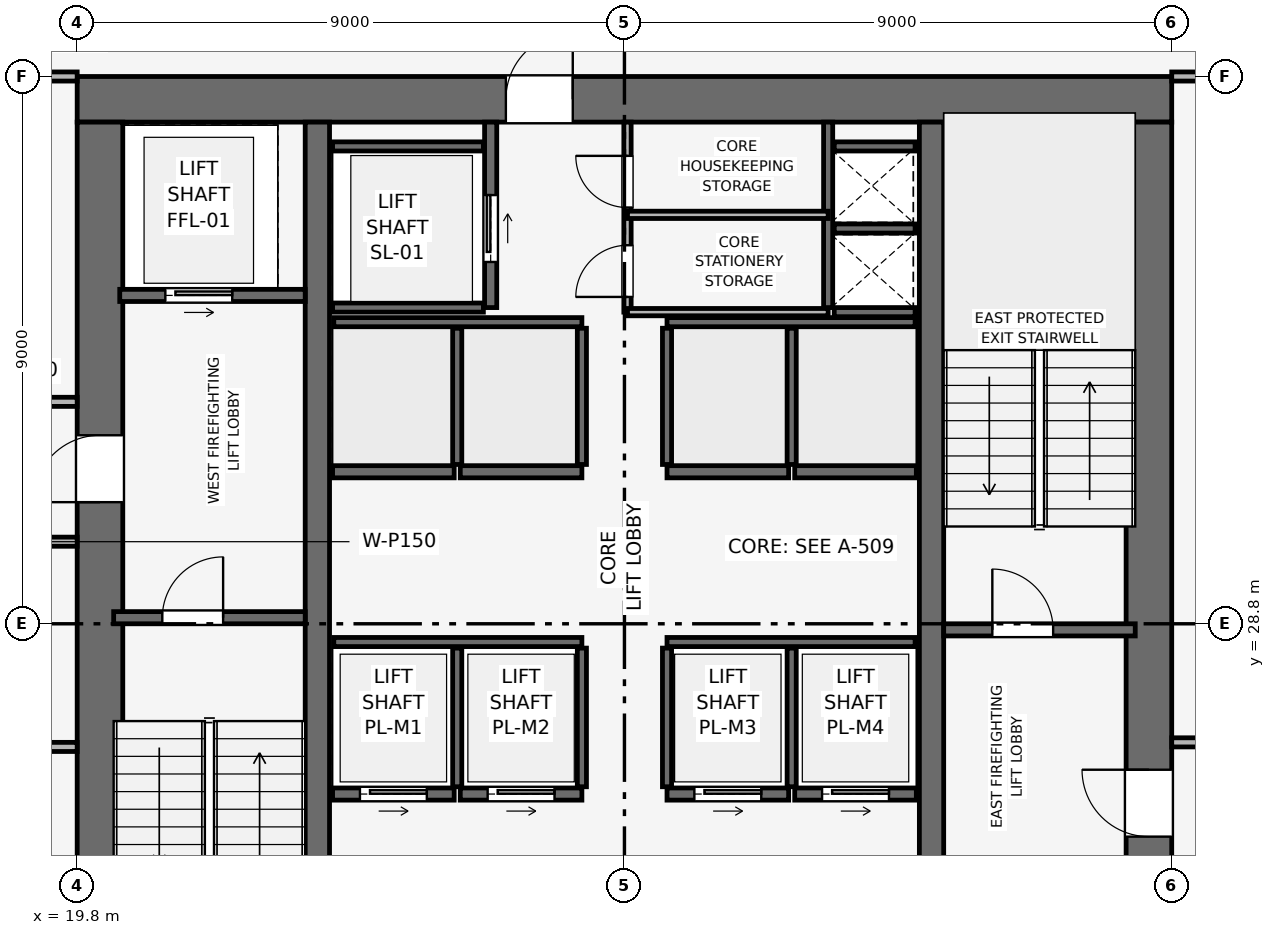
"""IFC4 building model, lengths in metres.
Left out: names, types, materials, properties, quantities, classifications, styles, units other than length and angle.
Written with IfcOpenShell. Run it as: python <this file> out.ifc"""

import sys

from ifc_helpers import new_model, si_unit, direction, frame, frame_2d, origin, place, context, subcontext, project, spatial, rectangle, extrude, element, fill, save


model = new_model("IFC4")
c1 = context("Model", 3, precision=1e-05, world=origin(), true_north=direction((0.0, 1.0)))
c2 = subcontext(c1, "Body", "Model", "MODEL_VIEW")
j1 = project(units=[si_unit("LENGTHUNIT", "METRE"), si_unit("PLANEANGLEUNIT", "RADIAN")], contexts=[c1])
p1 = place(None, origin())
s1 = spatial("IfcSite", under=j1, at=p1, CompositionType="ELEMENT")
p2 = place(p1, origin())
s2 = spatial("IfcBuilding", under=s1, at=p2, CompositionType="ELEMENT")
p3 = place(p2, frame((0.0, 0.0, 199.95)))
s3 = spatial("IfcBuildingStorey", under=s2, at=p3, CompositionType="ELEMENT", Elevation=199.95)
p4 = place(p3, frame((19.8, 37.425, 0.0), z_axis=(0.0, 0.0, 1.0), x_axis=(1.0, 0.0, 0.0)))
e1 = element("IfcWall", 1, at=p4, inside=s3, PredefinedType="SHEAR", context=c2, shape_type="SweptSolid", body=[
    extrude(rectangle(XDim=18.0, YDim=0.75, at=frame_2d((9.0, 0.0))), origin(), (0.0, 0.0, 1.0), 3.75),
])
p5 = place(p4, frame((7.05, 0.0, 0.0)))
e2 = element("IfcOpeningElement", 2, at=p5, cuts=e1, PredefinedType="OPENING", context=c2, shape_type="SweptSolid", body=[
    extrude(rectangle(XDim=1.1, YDim=2.15, at=frame_2d((0.55, 1.075))), frame((0.0, 0.385, 0.0), z_axis=(0.0, -1.0, 0.0), x_axis=(1.0, 0.0, 0.0)), (0.0, 0.0, 1.0), 0.77),
])
p6 = place(p3, frame((20.175, 20.55, 0.0), z_axis=(0.0, 0.0, 1.0), x_axis=(0.0, 1.0, 0.0)))
e3 = element("IfcWall", 3, at=p6, inside=s3, PredefinedType="SHEAR", context=c2, shape_type="SweptSolid", body=[
    extrude(rectangle(XDim=16.5, YDim=0.75, at=frame_2d((8.25, 0.0))), origin(), (0.0, 0.0, 1.0), 3.75),
])
p7 = place(p6, frame((10.25, 0.0, 0.0)))
e4 = element("IfcOpeningElement", 4, at=p7, cuts=e3, PredefinedType="OPENING", context=c2, shape_type="SweptSolid", body=[
    extrude(rectangle(XDim=1.1, YDim=2.15, at=frame_2d((0.55, 1.075))), frame((0.0, 0.385, 0.0), z_axis=(0.0, -1.0, 0.0), x_axis=(1.0, 0.0, 0.0)), (0.0, 0.0, 1.0), 0.77),
])
p8 = place(p3, frame((37.425, 20.55, 0.0), z_axis=(0.0, 0.0, 1.0), x_axis=(0.0, 1.0, 0.0)))
e5 = element("IfcWall", 5, at=p8, inside=s3, PredefinedType="SHEAR", context=c2, shape_type="SweptSolid", body=[
    extrude(rectangle(XDim=16.5, YDim=0.75, at=frame_2d((8.25, 0.0))), origin(), (0.0, 0.0, 1.0), 3.75),
])
p9 = place(p8, frame((4.75, 0.0, 0.0)))
e6 = element("IfcOpeningElement", 6, at=p9, cuts=e5, PredefinedType="OPENING", context=c2, shape_type="SweptSolid", body=[
    extrude(rectangle(XDim=1.1, YDim=2.15, at=frame_2d((0.55, 1.075))), frame((0.0, 0.385, 0.0), z_axis=(0.0, -1.0, 0.0), x_axis=(1.0, 0.0, 0.0)), (0.0, 0.0, 1.0), 0.77),
])
for number, where, z_axis, x_axis in (
    (7, (23.75, 20.55, 0.0), (0.0, 0.0, 1.0), (0.0, 1.0, 0.0)),
    (8, (33.85, 20.55, 0.0), (0.0, 0.0, 1.0), (0.0, 1.0, 0.0)),
):
    element("IfcWall", number, at=place(p3, frame(where, z_axis=z_axis, x_axis=x_axis)), inside=s3, PredefinedType="SHEAR", context=c2, shape_type="SweptSolid", body=[
        extrude(rectangle(XDim=16.5, YDim=0.4, at=frame_2d((8.25, 0.0))), origin(), (0.0, 0.0, 1.0), 3.75),
    ])
p10 = place(p3, frame((20.4, 28.9, 0.0), z_axis=(0.0, 0.0, 1.0), x_axis=(1.0, 0.0, 0.0)))
e9 = element("IfcWall", 9, at=p10, inside=s3, PredefinedType="SHEAR", context=c2, shape_type="SweptSolid", body=[
    extrude(rectangle(XDim=3.15, YDim=0.2, at=frame_2d((1.575, 0.0))), origin(), (0.0, 0.0, 1.0), 3.5),
])
p11 = place(p10, frame((0.8, 0.0, 0.0)))
e10 = element("IfcOpeningElement", 10, at=p11, cuts=e9, PredefinedType="OPENING", context=c2, shape_type="SweptSolid", body=[
    extrude(rectangle(XDim=1.0, YDim=2.1, at=frame_2d((0.5, 1.05))), frame((0.0, 0.11, 0.0), z_axis=(0.0, -1.0, 0.0), x_axis=(1.0, 0.0, 0.0)), (0.0, 0.0, 1.0), 0.22),
])
p12 = place(p3, frame((34.05, 28.7, 0.0), z_axis=(0.0, 0.0, 1.0), x_axis=(1.0, 0.0, 0.0)))
e11 = element("IfcWall", 11, at=p12, inside=s3, PredefinedType="SHEAR", context=c2, shape_type="SweptSolid", body=[
    extrude(rectangle(XDim=3.15, YDim=0.2, at=frame_2d((1.575, 0.0))), origin(), (0.0, 0.0, 1.0), 3.5),
])
p13 = place(p12, frame((0.8, 0.0, 0.0)))
e12 = element("IfcOpeningElement", 12, at=p13, cuts=e11, PredefinedType="OPENING", context=c2, shape_type="SweptSolid", body=[
    extrude(rectangle(XDim=1.0, YDim=2.1, at=frame_2d((0.5, 1.05))), frame((0.0, 0.11, 0.0), z_axis=(0.0, -1.0, 0.0), x_axis=(1.0, 0.0, 0.0)), (0.0, 0.0, 1.0), 0.22),
])
p14 = place(p3, frame((32.15, 34.0, 0.0), z_axis=(0.0, 0.0, 1.0), x_axis=(0.0, 1.0, 0.0)))
e13 = element("IfcWall", 13, at=p14, inside=s3, PredefinedType="SHEAR", context=c2, shape_type="SweptSolid", body=[
    extrude(rectangle(XDim=3.05, YDim=0.15, at=frame_2d((1.525, 0.0))), origin(), (0.0, 0.0, 1.0), 3.5),
])
for number, where, z_axis, x_axis in (
    (14, (32.25, 33.925, 0.0), (0.0, 0.0, 1.0), (1.0, 0.0, 0.0)),
    (15, (32.25, 35.3, 0.0), (0.0, 0.0, 1.0), (1.0, 0.0, 0.0)),
):
    element("IfcWall", number, at=place(p3, frame(where, z_axis=z_axis, x_axis=x_axis)), inside=s3, PredefinedType="SHEAR", context=c2, shape_type="SweptSolid", body=[
        extrude(rectangle(XDim=1.33, YDim=0.15, at=frame_2d((0.665, 0.0))), origin(), (0.0, 0.0, 1.0), 3.5),
    ])
p15 = place(p3, frame((20.5, 34.2, 0.0), z_axis=(0.0, 0.0, 1.0), x_axis=(1.0, 0.0, 0.0)))
e16 = element("IfcWall", 16, at=p15, inside=s3, PredefinedType="SHEAR", context=c2, shape_type="SweptSolid", body=[
    extrude(rectangle(XDim=3.05, YDim=0.2, at=frame_2d((1.525, 0.0))), origin(), (0.0, 0.0, 1.0), 3.5),
])
p16 = place(p15, frame((0.75, 0.0, 0.0)))
e17 = element("IfcOpeningElement", 17, at=p16, cuts=e16, PredefinedType="OPENING", context=c2, shape_type="SweptSolid", body=[
    extrude(rectangle(XDim=1.1, YDim=2.15, at=frame_2d((0.55, 1.075))), frame((0.0, 0.11, 0.0), z_axis=(0.0, -1.0, 0.0), x_axis=(1.0, 0.0, 0.0)), (0.0, 0.0, 1.0), 0.22),
])
p17 = place(p3, frame((26.6, 34.0, 0.0), z_axis=(0.0, 0.0, 1.0), x_axis=(0.0, 1.0, 0.0)))
e18 = element("IfcWall", 18, at=p17, inside=s3, PredefinedType="SHEAR", context=c2, shape_type="SweptSolid", body=[
    extrude(rectangle(XDim=3.05, YDim=0.2, at=frame_2d((1.525, 0.0))), origin(), (0.0, 0.0, 1.0), 3.5),
])
p18 = place(p17, frame((0.75, 0.0, 0.0)))
e19 = element("IfcOpeningElement", 19, at=p18, cuts=e18, PredefinedType="OPENING", context=c2, shape_type="SweptSolid", body=[
    extrude(rectangle(XDim=1.1, YDim=2.15, at=frame_2d((0.55, 1.075))), frame((0.0, 0.11, 0.0), z_axis=(0.0, -1.0, 0.0), x_axis=(1.0, 0.0, 0.0)), (0.0, 0.0, 1.0), 0.22),
])
for number, where, z_axis, x_axis in (
    (20, (24.0, 34.0, 0.0), (0.0, 0.0, 1.0), (1.0, 0.0, 0.0)),
    (21, (24.0, 36.65, 0.0), (0.0, 0.0, 1.0), (1.0, 0.0, 0.0)),
):
    element("IfcWall", number, at=place(p3, frame(where, z_axis=z_axis, x_axis=x_axis)), inside=s3, PredefinedType="SHEAR", context=c2, shape_type="SweptSolid", body=[
        extrude(rectangle(XDim=2.48, YDim=0.15, at=frame_2d((1.24, 0.0))), origin(), (0.0, 0.0, 1.0), 3.5),
    ])
p19 = place(p3, frame((24.0, 26.0, 0.0), z_axis=(0.0, 0.0, 1.0), x_axis=(1.0, 0.0, 0.0)))
e22 = element("IfcWall", 22, at=p19, inside=s3, PredefinedType="SHEAR", context=c2, shape_type="SweptSolid", body=[
    extrude(rectangle(XDim=2.0, YDim=0.2, at=frame_2d((1.0, 0.0))), origin(), (0.0, 0.0, 1.0), 3.5),
])
p20 = place(p19, frame((0.45, 0.0, 0.0)))
e23 = element("IfcOpeningElement", 23, at=p20, cuts=e22, PredefinedType="OPENING", context=c2, shape_type="SweptSolid", body=[
    extrude(rectangle(XDim=1.1, YDim=2.15, at=frame_2d((0.55, 1.075))), frame((0.0, 0.11, 0.0), z_axis=(0.0, -1.0, 0.0), x_axis=(1.0, 0.0, 0.0)), (0.0, 0.0, 1.0), 0.22),
])
p21 = place(p3, frame((26.1, 26.0, 0.0), z_axis=(0.0, 0.0, 1.0), x_axis=(1.0, 0.0, 0.0)))
e24 = element("IfcWall", 24, at=p21, inside=s3, PredefinedType="SHEAR", context=c2, shape_type="SweptSolid", body=[
    extrude(rectangle(XDim=2.0, YDim=0.2, at=frame_2d((1.0, 0.0))), origin(), (0.0, 0.0, 1.0), 3.5),
])
p22 = place(p21, frame((0.45, 0.0, 0.0)))
e25 = element("IfcOpeningElement", 25, at=p22, cuts=e24, PredefinedType="OPENING", context=c2, shape_type="SweptSolid", body=[
    extrude(rectangle(XDim=1.1, YDim=2.15, at=frame_2d((0.55, 1.075))), frame((0.0, 0.11, 0.0), z_axis=(0.0, -1.0, 0.0), x_axis=(1.0, 0.0, 0.0)), (0.0, 0.0, 1.0), 0.22),
])
p23 = place(p3, frame((29.5, 26.0, 0.0), z_axis=(0.0, 0.0, 1.0), x_axis=(1.0, 0.0, 0.0)))
e26 = element("IfcWall", 26, at=p23, inside=s3, PredefinedType="SHEAR", context=c2, shape_type="SweptSolid", body=[
    extrude(rectangle(XDim=2.0, YDim=0.2, at=frame_2d((1.0, 0.0))), origin(), (0.0, 0.0, 1.0), 3.5),
])
p24 = place(p23, frame((0.45, 0.0, 0.0)))
e27 = element("IfcOpeningElement", 27, at=p24, cuts=e26, PredefinedType="OPENING", context=c2, shape_type="SweptSolid", body=[
    extrude(rectangle(XDim=1.1, YDim=2.15, at=frame_2d((0.55, 1.075))), frame((0.0, 0.11, 0.0), z_axis=(0.0, -1.0, 0.0), x_axis=(1.0, 0.0, 0.0)), (0.0, 0.0, 1.0), 0.22),
])
p25 = place(p3, frame((31.6, 26.0, 0.0), z_axis=(0.0, 0.0, 1.0), x_axis=(1.0, 0.0, 0.0)))
e28 = element("IfcWall", 28, at=p25, inside=s3, PredefinedType="SHEAR", context=c2, shape_type="SweptSolid", body=[
    extrude(rectangle(XDim=2.0, YDim=0.2, at=frame_2d((1.0, 0.0))), origin(), (0.0, 0.0, 1.0), 3.5),
])
p26 = place(p25, frame((0.45, 0.0, 0.0)))
e29 = element("IfcOpeningElement", 29, at=p26, cuts=e28, PredefinedType="OPENING", context=c2, shape_type="SweptSolid", body=[
    extrude(rectangle(XDim=1.1, YDim=2.15, at=frame_2d((0.55, 1.075))), frame((0.0, 0.11, 0.0), z_axis=(0.0, -1.0, 0.0), x_axis=(1.0, 0.0, 0.0)), (0.0, 0.0, 1.0), 0.22),
])
for number, where, z_axis, x_axis in (
    (30, (24.0, 31.3, 0.0), (0.0, 0.0, 1.0), (1.0, 0.0, 0.0)),
    (31, (26.1, 31.3, 0.0), (0.0, 0.0, 1.0), (1.0, 0.0, 0.0)),
    (32, (29.5, 31.3, 0.0), (0.0, 0.0, 1.0), (1.0, 0.0, 0.0)),
    (33, (31.6, 31.3, 0.0), (0.0, 0.0, 1.0), (1.0, 0.0, 0.0)),
):
    element("IfcWall", number, at=place(p3, frame(where, z_axis=z_axis, x_axis=x_axis)), inside=s3, PredefinedType="SHEAR", context=c2, shape_type="SweptSolid", body=[
        extrude(rectangle(XDim=2.0, YDim=0.2, at=frame_2d((1.0, 0.0))), origin(), (0.0, 0.0, 1.0), 3.5),
    ])
p27 = place(p3, frame((32.25, 36.65, 0.0), z_axis=(0.0, 0.0, 1.0), x_axis=(1.0, 0.0, 0.0)))
e34 = element("IfcWall", 34, at=p27, inside=s3, PredefinedType="SHEAR", context=c2, shape_type="SweptSolid", body=[
    extrude(rectangle(XDim=1.33, YDim=0.15, at=frame_2d((0.665, 0.0))), origin(), (0.0, 0.0, 1.0), 3.5),
])
for number, where, z_axis, x_axis in (
    (35, (24.02, 28.5, 0.0), (0.0, 0.0, 1.0), (1.0, 0.0, 0.0)),
    (36, (29.5, 28.5, 0.0), (0.0, 0.0, 1.0), (1.0, 0.0, 0.0)),
):
    element("IfcWall", number, at=place(p3, frame(where, z_axis=z_axis, x_axis=x_axis)), inside=s3, PredefinedType="SHEAR", context=c2, shape_type="SweptSolid", body=[
        extrude(rectangle(XDim=4.08, YDim=0.15, at=frame_2d((2.04, 0.0))), origin(), (0.0, 0.0, 1.0), 3.5),
    ])
for number, where, z_axis, x_axis in (
    (37, (26.05, 26.12, 0.0), (0.0, 0.0, 1.0), (0.0, 1.0, 0.0)),
    (38, (28.1, 26.12, 0.0), (0.0, 0.0, 1.0), (0.0, 1.0, 0.0)),
    (39, (29.5, 26.12, 0.0), (0.0, 0.0, 1.0), (0.0, 1.0, 0.0)),
    (40, (31.55, 26.12, 0.0), (0.0, 0.0, 1.0), (0.0, 1.0, 0.0)),
):
    element("IfcWall", number, at=place(p3, frame(where, z_axis=z_axis, x_axis=x_axis)), inside=s3, PredefinedType="SHEAR", context=c2, shape_type="SweptSolid", body=[
        extrude(rectangle(XDim=2.28, YDim=0.15, at=frame_2d((1.14, 0.0))), origin(), (0.0, 0.0, 1.0), 3.5),
    ])
for number, where, z_axis, x_axis in (
    (41, (24.02, 33.76, 0.0), (0.0, 0.0, 1.0), (1.0, 0.0, 0.0)),
    (42, (29.5, 33.76, 0.0), (0.0, 0.0, 1.0), (1.0, 0.0, 0.0)),
):
    element("IfcWall", number, at=place(p3, frame(where, z_axis=z_axis, x_axis=x_axis)), inside=s3, PredefinedType="SHEAR", context=c2, shape_type="SweptSolid", body=[
        extrude(rectangle(XDim=4.08, YDim=0.15, at=frame_2d((2.04, 0.0))), origin(), (0.0, 0.0, 1.0), 3.5),
    ])
for number, where, z_axis, x_axis in (
    (43, (26.05, 31.42, 0.0), (0.0, 0.0, 1.0), (0.0, 1.0, 0.0)),
    (44, (28.1, 31.42, 0.0), (0.0, 0.0, 1.0), (0.0, 1.0, 0.0)),
    (45, (29.5, 31.42, 0.0), (0.0, 0.0, 1.0), (0.0, 1.0, 0.0)),
    (46, (31.55, 31.42, 0.0), (0.0, 0.0, 1.0), (0.0, 1.0, 0.0)),
):
    element("IfcWall", number, at=place(p3, frame(where, z_axis=z_axis, x_axis=x_axis)), inside=s3, PredefinedType="SHEAR", context=c2, shape_type="SweptSolid", body=[
        extrude(rectangle(XDim=2.24, YDim=0.15, at=frame_2d((1.12, 0.0))), origin(), (0.0, 0.0, 1.0), 3.5),
    ])
p28 = place(p3, frame((28.85, 33.925, 0.0), z_axis=(0.0, 0.0, 1.0), x_axis=(0.0, 1.0, 0.0)))
e47 = element("IfcWall", 47, at=p28, inside=s3, PredefinedType="PARTITIONING", context=c2, shape_type="SweptSolid", body=[
    extrude(rectangle(XDim=3.125, YDim=0.12, at=frame_2d((1.562, 0.0))), origin(), (0.0, 0.0, 1.0), 3.5),
])
p29 = place(p28, frame((0.25, 0.0, 0.0)))
e48 = element("IfcOpeningElement", 48, at=p29, cuts=e47, PredefinedType="OPENING", context=c2, shape_type="SweptSolid", body=[
    extrude(rectangle(XDim=0.85, YDim=2.1, at=frame_2d((0.425, 1.05))), frame((0.0, 0.07, 0.0), z_axis=(0.0, -1.0, 0.0), x_axis=(1.0, 0.0, 0.0)), (0.0, 0.0, 1.0), 0.14),
])
p30 = place(p28, frame((1.72, 0.0, 0.0)))
e49 = element("IfcOpeningElement", 49, at=p30, cuts=e47, PredefinedType="OPENING", context=c2, shape_type="SweptSolid", body=[
    extrude(rectangle(XDim=0.85, YDim=2.1, at=frame_2d((0.425, 1.05))), frame((0.0, 0.07, 0.0), z_axis=(0.0, -1.0, 0.0), x_axis=(1.0, 0.0, 0.0)), (0.0, 0.0, 1.0), 0.14),
])
for number, where, z_axis, x_axis in (
    (50, (28.85, 35.525, 0.0), (0.0, 0.0, 1.0), (1.0, 0.0, 0.0)),
    (51, (28.85, 33.925, 0.0), (0.0, 0.0, 1.0), (1.0, 0.0, 0.0)),
):
    element("IfcWall", number, at=place(p3, frame(where, z_axis=z_axis, x_axis=x_axis)), inside=s3, PredefinedType="PARTITIONING", context=c2, shape_type="SweptSolid", body=[
        extrude(rectangle(XDim=3.3, YDim=0.12, at=frame_2d((1.65, 0.0))), origin(), (0.0, 0.0, 1.0), 3.5),
    ])
for number, where, z_axis, x_axis in (
    (52, (15.4, 26.775, 0.0), (0.0, 0.0, 1.0), (1.0, 0.0, 0.0)),
    (53, (15.4, 30.15, 0.0), (0.0, 0.0, 1.0), (1.0, 0.0, 0.0)),
    (54, (15.4, 32.45, 0.0), (0.0, 0.0, 1.0), (1.0, 0.0, 0.0)),
):
    element("IfcWall", number, at=place(p3, frame(where, z_axis=z_axis, x_axis=x_axis)), inside=s3, PredefinedType="PARTITIONING", context=c2, shape_type="SweptSolid", body=[
        extrude(rectangle(XDim=4.4, YDim=0.15, at=frame_2d((2.2, 0.0))), origin(), (0.0, 0.0, 1.0), 3.5),
    ])
p31 = place(p3, frame((15.4, 37.8, 0.0), z_axis=(0.0, 0.0, 1.0), x_axis=(1.0, 0.0, 0.0)))
e55 = element("IfcWall", 55, at=p31, inside=s3, PredefinedType="PARTITIONING", context=c2, shape_type="SweptSolid", body=[
    extrude(rectangle(XDim=4.4, YDim=0.15, at=frame_2d((2.2, 0.0))), origin(), (0.0, 0.0, 1.0), 3.035),
])
p32 = place(p3, frame((37.8, 26.85, 0.0), z_axis=(0.0, 0.0, 1.0), x_axis=(1.0, 0.0, 0.0)))
e56 = element("IfcWall", 56, at=p32, inside=s3, PredefinedType="PARTITIONING", context=c2, shape_type="SweptSolid", body=[
    extrude(rectangle(XDim=2.25, YDim=0.15, at=frame_2d((1.125, 0.0))), origin(), (0.0, 0.0, 1.0), 3.5),
])
p33 = place(p3, frame((37.8, 37.8, 0.0), z_axis=(0.0, 0.0, 1.0), x_axis=(1.0, 0.0, 0.0)))
e57 = element("IfcWall", 57, at=p33, inside=s3, PredefinedType="PARTITIONING", context=c2, shape_type="SweptSolid", body=[
    extrude(rectangle(XDim=17.87, YDim=0.15, at=frame_2d((8.935, 0.0))), origin(), (0.0, 0.0, 1.0), 2.885),
])
p34 = place(p33, frame((2.5, 0.0, 0.0)))
e58 = element("IfcOpeningElement", 58, at=p34, cuts=e57, PredefinedType="OPENING", context=c2, shape_type="SweptSolid", body=[
    extrude(rectangle(XDim=0.9, YDim=2.1, at=frame_2d((0.45, 1.05))), frame((0.0, 0.085, 0.0), z_axis=(0.0, -1.0, 0.0), x_axis=(1.0, 0.0, 0.0)), (0.0, 0.0, 1.0), 0.17),
])
p35 = place(p11, origin())
e59 = element("IfcDoor", 59, at=p35, inside=s3, OperationType="SINGLE_SWING_RIGHT", PredefinedType="DOOR", context=c2, shape_type="SweptSolid", body=[
    extrude(rectangle(XDim=1.0, YDim=2.1, at=frame_2d((0.5, 1.05))), frame((0.0, 0.025, 0.0), z_axis=(0.0, -1.0, 0.0), x_axis=(1.0, 0.0, 0.0)), (0.0, 0.0, 1.0), 0.05),
])
fill(e10, e59)
p36 = place(p13, origin())
e60 = element("IfcDoor", 60, at=p36, inside=s3, OperationType="SINGLE_SWING_LEFT", PredefinedType="DOOR", context=c2, shape_type="SweptSolid", body=[
    extrude(rectangle(XDim=1.0, YDim=2.1, at=frame_2d((0.5, 1.05))), frame((0.0, 0.025, 0.0), z_axis=(0.0, -1.0, 0.0), x_axis=(1.0, 0.0, 0.0)), (0.0, 0.0, 1.0), 0.05),
])
fill(e12, e60)
p37 = place(p16, origin())
e61 = element("IfcDoor", 61, at=p37, inside=s3, OperationType="SLIDING_TO_RIGHT", PredefinedType="DOOR", context=c2, shape_type="SweptSolid", body=[
    extrude(rectangle(XDim=1.1, YDim=2.15, at=frame_2d((0.55, 1.075))), frame((0.0, 0.025, 0.0), z_axis=(0.0, -1.0, 0.0), x_axis=(1.0, 0.0, 0.0)), (0.0, 0.0, 1.0), 0.05),
])
fill(e17, e61)
p38 = place(p18, origin())
e62 = element("IfcDoor", 62, at=p38, inside=s3, OperationType="SLIDING_TO_RIGHT", PredefinedType="DOOR", context=c2, shape_type="SweptSolid", body=[
    extrude(rectangle(XDim=1.1, YDim=2.15, at=frame_2d((0.55, 1.075))), frame((0.0, 0.025, 0.0), z_axis=(0.0, -1.0, 0.0), x_axis=(1.0, 0.0, 0.0)), (0.0, 0.0, 1.0), 0.05),
])
fill(e19, e62)
p39 = place(p20, origin())
e63 = element("IfcDoor", 63, at=p39, inside=s3, OperationType="SLIDING_TO_RIGHT", PredefinedType="DOOR", context=c2, shape_type="SweptSolid", body=[
    extrude(rectangle(XDim=1.1, YDim=2.15, at=frame_2d((0.55, 1.075))), frame((0.0, 0.025, 0.0), z_axis=(0.0, -1.0, 0.0), x_axis=(1.0, 0.0, 0.0)), (0.0, 0.0, 1.0), 0.05),
])
fill(e23, e63)
p40 = place(p22, origin())
e64 = element("IfcDoor", 64, at=p40, inside=s3, OperationType="SLIDING_TO_RIGHT", PredefinedType="DOOR", context=c2, shape_type="SweptSolid", body=[
    extrude(rectangle(XDim=1.1, YDim=2.15, at=frame_2d((0.55, 1.075))), frame((0.0, 0.025, 0.0), z_axis=(0.0, -1.0, 0.0), x_axis=(1.0, 0.0, 0.0)), (0.0, 0.0, 1.0), 0.05),
])
fill(e25, e64)
p41 = place(p24, origin())
e65 = element("IfcDoor", 65, at=p41, inside=s3, OperationType="SLIDING_TO_RIGHT", PredefinedType="DOOR", context=c2, shape_type="SweptSolid", body=[
    extrude(rectangle(XDim=1.1, YDim=2.15, at=frame_2d((0.55, 1.075))), frame((0.0, 0.025, 0.0), z_axis=(0.0, -1.0, 0.0), x_axis=(1.0, 0.0, 0.0)), (0.0, 0.0, 1.0), 0.05),
])
fill(e27, e65)
p42 = place(p26, origin())
e66 = element("IfcDoor", 66, at=p42, inside=s3, OperationType="SLIDING_TO_RIGHT", PredefinedType="DOOR", context=c2, shape_type="SweptSolid", body=[
    extrude(rectangle(XDim=1.1, YDim=2.15, at=frame_2d((0.55, 1.075))), frame((0.0, 0.025, 0.0), z_axis=(0.0, -1.0, 0.0), x_axis=(1.0, 0.0, 0.0)), (0.0, 0.0, 1.0), 0.05),
])
fill(e29, e66)
p43 = place(p29, origin())
e67 = element("IfcDoor", 67, at=p43, inside=s3, OperationType="SINGLE_SWING_LEFT", PredefinedType="DOOR", context=c2, shape_type="SweptSolid", body=[
    extrude(rectangle(XDim=0.85, YDim=2.1, at=frame_2d((0.425, 1.05))), frame((0.0, 0.025, 0.0), z_axis=(0.0, -1.0, 0.0), x_axis=(1.0, 0.0, 0.0)), (0.0, 0.0, 1.0), 0.05),
])
fill(e48, e67)
p44 = place(p30, origin())
e68 = element("IfcDoor", 68, at=p44, inside=s3, OperationType="SINGLE_SWING_RIGHT", PredefinedType="DOOR", context=c2, shape_type="SweptSolid", body=[
    extrude(rectangle(XDim=0.85, YDim=2.1, at=frame_2d((0.425, 1.05))), frame((0.0, 0.025, 0.0), z_axis=(0.0, -1.0, 0.0), x_axis=(1.0, 0.0, 0.0)), (0.0, 0.0, 1.0), 0.05),
])
fill(e49, e68)
p45 = place(p7, origin())
e69 = element("IfcDoor", 69, at=p45, inside=s3, OperationType="SINGLE_SWING_LEFT", PredefinedType="DOOR", context=c2, shape_type="SweptSolid", body=[
    extrude(rectangle(XDim=1.1, YDim=2.15, at=frame_2d((0.55, 1.075))), frame((0.0, 0.025, 0.0), z_axis=(0.0, -1.0, 0.0), x_axis=(1.0, 0.0, 0.0)), (0.0, 0.0, 1.0), 0.05),
])
fill(e4, e69)
p46 = place(p9, origin())
e70 = element("IfcDoor", 70, at=p46, inside=s3, OperationType="SINGLE_SWING_RIGHT", PredefinedType="DOOR", context=c2, shape_type="SweptSolid", body=[
    extrude(rectangle(XDim=1.1, YDim=2.15, at=frame_2d((0.55, 1.075))), frame((0.0, 0.025, 0.0), z_axis=(0.0, -1.0, 0.0), x_axis=(1.0, 0.0, 0.0)), (0.0, 0.0, 1.0), 0.05),
])
fill(e6, e70)
p47 = place(p5, origin())
e71 = element("IfcDoor", 71, at=p47, inside=s3, OperationType="SINGLE_SWING_RIGHT", PredefinedType="DOOR", context=c2, shape_type="SweptSolid", body=[
    extrude(rectangle(XDim=1.1, YDim=2.15, at=frame_2d((0.55, 1.075))), frame((0.0, 0.025, 0.0), z_axis=(0.0, -1.0, 0.0), x_axis=(1.0, 0.0, 0.0)), (0.0, 0.0, 1.0), 0.05),
])
fill(e2, e71)
save(model, sys.argv[1])
